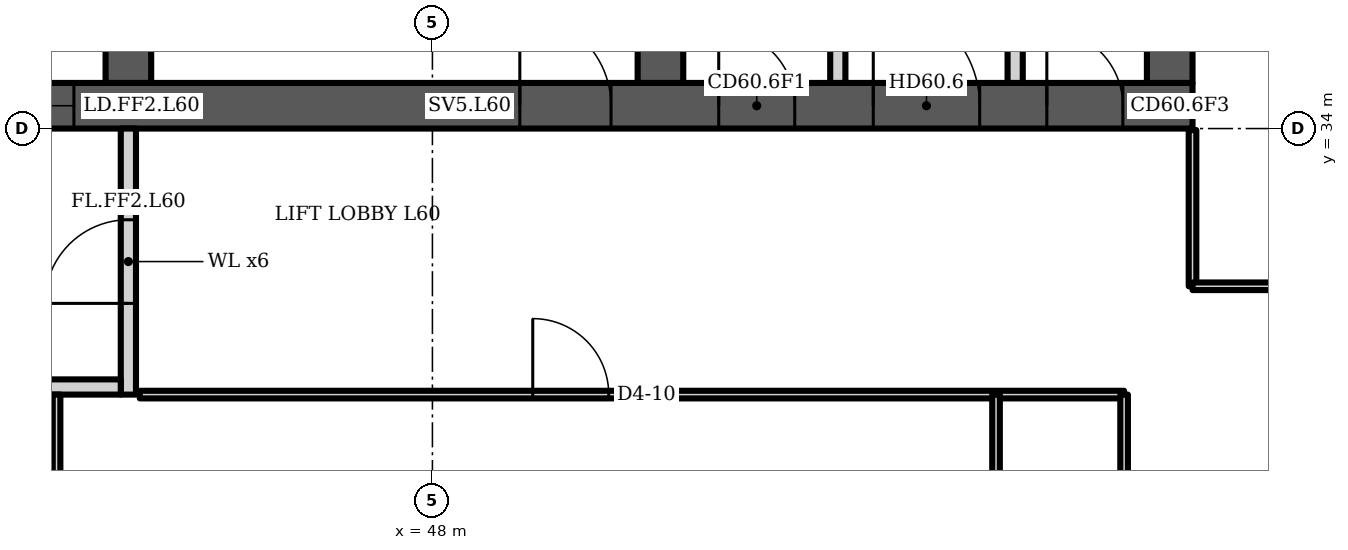
"""IFC4 building model, lengths in metres.
Left out: names, types, materials, properties, quantities, classifications, styles, units other than length and angle.
Written with IfcOpenShell. Run it as: python <this file> out.ifc"""

import sys

from ifc_helpers import new_model, si_unit, direction, frame, frame_2d, origin, place, context, subcontext, project, spatial, polyline, rectangle, outline, extrude, element, fill, save


model = new_model("IFC4")
c1 = context("Model", 3, precision=1e-05, world=origin(), true_north=direction((0.0, 1.0)))
c2 = subcontext(c1, "Body", "Model", "MODEL_VIEW")
j1 = project(units=[si_unit("LENGTHUNIT", "METRE"), si_unit("PLANEANGLEUNIT", "RADIAN")], contexts=[c1])
p1 = place(None, origin())
s1 = spatial("IfcSite", under=j1, at=p1, CompositionType="ELEMENT")
p2 = place(p1, origin())
s2 = spatial("IfcBuilding", under=s1, at=p2, CompositionType="ELEMENT")
p3 = place(p2, frame((0.0, 0.0, 239.5)))
s3 = spatial("IfcBuildingStorey", under=s2, at=p3, CompositionType="ELEMENT", Elevation=239.5)
p4 = place(p3, frame((23.0, 34.3, 0.0), z_axis=(0.0, 0.0, 1.0), x_axis=(1.0, 0.0, 0.0)))
e1 = element("IfcWall", 1, at=p4, inside=s3, PredefinedType="SHEAR", context=c2, shape_type="SweptSolid", body=[
    extrude(rectangle(XDim=35.0, YDim=0.6, at=frame_2d((17.5, 0.0))), origin(), (0.0, 0.0, 1.0), 3.6),
])
p5 = place(p4, frame((0.65, 0.0, 0.0)))
e2 = element("IfcOpeningElement", 2, at=p5, cuts=e1, PredefinedType="OPENING", context=c2, shape_type="SweptSolid", body=[
    extrude(rectangle(XDim=1.2, YDim=2.1, at=frame_2d((0.6, 1.05))), frame((0.0, 0.31, 0.0), z_axis=(0.0, -1.0, 0.0), x_axis=(1.0, 0.0, 0.0)), (0.0, 0.0, 1.0), 0.62),
])
p6 = place(p4, frame((7.717, 0.0, 0.0)))
e3 = element("IfcOpeningElement", 3, at=p6, cuts=e1, PredefinedType="OPENING", context=c2, shape_type="SweptSolid", body=[
    extrude(rectangle(XDim=1.1, YDim=2.1, at=frame_2d((0.55, 1.05))), frame((0.0, 0.31, 0.0), z_axis=(0.0, -1.0, 0.0), x_axis=(1.0, 0.0, 0.0)), (0.0, 0.0, 1.0), 0.62),
])
p7 = place(p4, frame((12.183, 0.0, 0.0)))
e4 = element("IfcOpeningElement", 4, at=p7, cuts=e1, PredefinedType="OPENING", context=c2, shape_type="SweptSolid", body=[
    extrude(rectangle(XDim=1.1, YDim=2.1, at=frame_2d((0.55, 1.05))), frame((0.0, 0.31, 0.0), z_axis=(0.0, -1.0, 0.0), x_axis=(1.0, 0.0, 0.0)), (0.0, 0.0, 1.0), 0.62),
])
p8 = place(p4, frame((9.8, 0.0, 0.0)))
e5 = element("IfcOpeningElement", 5, at=p8, cuts=e1, PredefinedType="OPENING", context=c2, shape_type="SweptSolid", body=[
    extrude(rectangle(XDim=1.4, YDim=2.1, at=frame_2d((0.7, 1.05))), frame((0.0, 0.31, 0.0), z_axis=(0.0, -1.0, 0.0), x_axis=(1.0, 0.0, 0.0)), (0.0, 0.0, 1.0), 0.62),
])
p9 = place(p4, frame((14.717, 0.0, 0.0)))
e6 = element("IfcOpeningElement", 6, at=p9, cuts=e1, PredefinedType="OPENING", context=c2, shape_type="SweptSolid", body=[
    extrude(rectangle(XDim=1.1, YDim=2.1, at=frame_2d((0.55, 1.05))), frame((0.0, 0.31, 0.0), z_axis=(0.0, -1.0, 0.0), x_axis=(1.0, 0.0, 0.0)), (0.0, 0.0, 1.0), 0.62),
])
p10 = place(p4, frame((16.95, 0.0, 0.0)))
e7 = element("IfcOpeningElement", 7, at=p10, cuts=e1, PredefinedType="OPENING", context=c2, shape_type="SweptSolid", body=[
    extrude(rectangle(XDim=1.1, YDim=2.1, at=frame_2d((0.55, 1.05))), frame((0.0, 0.31, 0.0), z_axis=(0.0, -1.0, 0.0), x_axis=(1.0, 0.0, 0.0)), (0.0, 0.0, 1.0), 0.62),
])
p11 = place(p4, frame((19.183, 0.0, 0.0)))
e8 = element("IfcOpeningElement", 8, at=p11, cuts=e1, PredefinedType="OPENING", context=c2, shape_type="SweptSolid", body=[
    extrude(rectangle(XDim=1.1, YDim=2.1, at=frame_2d((0.55, 1.05))), frame((0.0, 0.31, 0.0), z_axis=(0.0, -1.0, 0.0), x_axis=(1.0, 0.0, 0.0)), (0.0, 0.0, 1.0), 0.62),
])
p12 = place(p4, frame((26.15, 0.0, 0.0)))
e9 = element("IfcOpeningElement", 9, at=p12, cuts=e1, PredefinedType="OPENING", context=c2, shape_type="SweptSolid", body=[
    extrude(rectangle(XDim=1.2, YDim=2.1, at=frame_2d((0.6, 1.05))), frame((0.0, 0.31, 0.0), z_axis=(0.0, -1.0, 0.0), x_axis=(1.0, 0.0, 0.0)), (0.0, 0.0, 1.0), 0.62),
])
p13 = place(p4, frame((28.767, 0.0, 0.0)))
e10 = element("IfcOpeningElement", 10, at=p13, cuts=e1, PredefinedType="OPENING", context=c2, shape_type="SweptSolid", body=[
    extrude(rectangle(XDim=1.0, YDim=2.1, at=frame_2d((0.5, 1.05))), frame((0.0, 0.31, 0.0), z_axis=(0.0, -1.0, 0.0), x_axis=(1.0, 0.0, 0.0)), (0.0, 0.0, 1.0), 0.62),
])
p14 = place(p4, frame((33.083, 0.0, 0.0)))
e11 = element("IfcOpeningElement", 11, at=p14, cuts=e1, PredefinedType="OPENING", context=c2, shape_type="SweptSolid", body=[
    extrude(rectangle(XDim=1.0, YDim=2.1, at=frame_2d((0.5, 1.05))), frame((0.0, 0.31, 0.0), z_axis=(0.0, -1.0, 0.0), x_axis=(1.0, 0.0, 0.0)), (0.0, 0.0, 1.0), 0.62),
])
p15 = place(p4, frame((30.8, 0.0, 0.0)))
e12 = element("IfcOpeningElement", 12, at=p15, cuts=e1, PredefinedType="OPENING", context=c2, shape_type="SweptSolid", body=[
    extrude(rectangle(XDim=1.4, YDim=2.1, at=frame_2d((0.7, 1.05))), frame((0.0, 0.31, 0.0), z_axis=(0.0, -1.0, 0.0), x_axis=(1.0, 0.0, 0.0)), (0.0, 0.0, 1.0), 0.62),
])
p16 = place(p3, frame((44.0, 34.6, 0.0), z_axis=(0.0, 0.0, 1.0), x_axis=(0.0, 1.0, 0.0)))
e13 = element("IfcWall", 13, at=p16, inside=s3, PredefinedType="SHEAR", context=c2, shape_type="SweptSolid", body=[
    extrude(rectangle(XDim=14.784, YDim=0.6, at=frame_2d((7.392, 0.0))), origin(), (0.0, 0.0, 1.0), 3.6),
])
p17 = place(p16, frame((11.608, 0.0, 0.0)))
e14 = element("IfcOpeningElement", 14, at=p17, cuts=e13, PredefinedType="OPENING", context=c2, shape_type="SweptSolid", body=[
    extrude(rectangle(XDim=1.0, YDim=2.1, at=frame_2d((0.5, 1.05))), frame((0.0, 0.31, 0.0), z_axis=(0.0, -1.0, 0.0), x_axis=(1.0, 0.0, 0.0)), (0.0, 0.0, 1.0), 0.62),
])
p18 = place(p16, frame((3.8, 0.0, 0.0)))
e15 = element("IfcOpeningElement", 15, at=p18, cuts=e13, PredefinedType="OPENING", context=c2, shape_type="SweptSolid", body=[
    extrude(rectangle(XDim=1.1, YDim=2.1, at=frame_2d((0.55, 1.05))), frame((0.0, 0.31, 0.0), z_axis=(0.0, -1.0, 0.0), x_axis=(1.0, 0.0, 0.0)), (0.0, 0.0, 1.0), 0.62),
])
p19 = place(p3, frame((51.0, 34.6, 0.0), z_axis=(0.0, 0.0, 1.0), x_axis=(0.0, 1.0, 0.0)))
e16 = element("IfcWall", 16, at=p19, inside=s3, PredefinedType="SHEAR", context=c2, shape_type="SweptSolid", body=[
    extrude(rectangle(XDim=14.171, YDim=0.6, at=frame_2d((7.085, 0.0))), origin(), (0.0, 0.0, 1.0), 3.6),
])
p20 = place(p19, frame((3.8, 0.0, 0.0)))
e17 = element("IfcOpeningElement", 17, at=p20, cuts=e16, PredefinedType="OPENING", context=c2, shape_type="SweptSolid", body=[
    extrude(rectangle(XDim=1.1, YDim=2.1, at=frame_2d((0.55, 1.05))), frame((0.0, 0.31, 0.0), z_axis=(0.0, -1.0, 0.0), x_axis=(1.0, 0.0, 0.0)), (0.0, 0.0, 1.0), 0.62),
])
p21 = place(p3, frame((57.7, 34.6, 0.0), z_axis=(0.0, 0.0, 1.0), x_axis=(0.0, 1.0, 0.0)))
e18 = element("IfcWall", 18, at=p21, inside=s3, PredefinedType="SHEAR", context=c2, shape_type="SweptSolid", body=[
    extrude(rectangle(XDim=13.585, YDim=0.6, at=frame_2d((6.792, 0.0))), origin(), (0.0, 0.0, 1.0), 3.6),
])
p22 = place(p3, frame((0.0, 0.0, -0.0)))
e19 = element("IfcWall", 19, at=p22, inside=s3, PredefinedType="PARTITIONING", context=c2, shape_type="SweptSolid", body=[
    extrude(outline(polyline([(41.567, 37.1), (39.433, 37.1), (39.433, 34.6), (39.233, 34.6), (39.233, 37.45), (37.3, 37.45), (37.3, 37.65), (39.233, 37.65), (39.433, 37.65), (39.433, 37.3), (41.567, 37.3), (41.567, 37.35), (41.767, 37.35), (43.7, 37.35), (43.7, 37.15), (41.767, 37.15), (41.767, 34.6), (41.567, 34.6), (41.567, 37.1)])), origin(), (0.0, 0.0, 1.0), 3.2),
])
p23 = place(p3, frame((0.0, 0.0, -0.0)))
e20 = element("IfcWall", 20, at=p23, inside=s3, PredefinedType="PARTITIONING", context=c2, shape_type="SweptSolid", body=[
    extrude(outline(polyline([(53.233, 34.6), (53.233, 37.3), (53.433, 37.3), (53.433, 34.6), (53.233, 34.6)])), origin(), (0.0, 0.0, 1.0), 3.2),
])
p24 = place(p3, frame((0.0, 0.0, -0.0)))
e21 = element("IfcWall", 21, at=p24, inside=s3, PredefinedType="PARTITIONING", context=c2, shape_type="SweptSolid", body=[
    extrude(outline(polyline([(55.567, 34.6), (55.567, 37.3), (55.767, 37.3), (55.767, 34.6), (55.567, 34.6)])), origin(), (0.0, 0.0, 1.0), 3.2),
])
p25 = place(p3, frame((44.0, 30.5, 0.0), z_axis=(0.0, 0.0, 1.0), x_axis=(0.0, 1.0, 0.0)))
e22 = element("IfcWall", 22, at=p25, inside=s3, PredefinedType="PARTITIONING", context=c2, shape_type="SweptSolid", body=[
    extrude(rectangle(XDim=3.5, YDim=0.2, at=frame_2d((1.75, 0.0))), origin(), (0.0, 0.0, 1.0), 3.2),
])
p26 = place(p25, frame((1.2, 0.0, 0.0)))
e23 = element("IfcOpeningElement", 23, at=p26, cuts=e22, PredefinedType="OPENING", context=c2, shape_type="SweptSolid", body=[
    extrude(rectangle(XDim=1.1, YDim=2.1, at=frame_2d((0.55, 1.05))), frame((0.0, 0.11, 0.0), z_axis=(0.0, -1.0, 0.0), x_axis=(1.0, 0.0, 0.0)), (0.0, 0.0, 1.0), 0.22),
])
p27 = place(p3, frame((41.1, 30.6, 0.0), z_axis=(0.0, 0.0, 1.0), x_axis=(1.0, 0.0, 0.0)))
e24 = element("IfcWall", 24, at=p27, inside=s3, PredefinedType="PARTITIONING", context=c2, shape_type="SweptSolid", body=[
    extrude(rectangle(XDim=2.8, YDim=0.2, at=frame_2d((1.4, 0.0))), origin(), (0.0, 0.0, 1.0), 3.2),
])
p28 = place(p3, frame((43.055, 14.86, 0.0), z_axis=(0.0, 0.0, 1.0), x_axis=(0.0, 1.0, 0.0)))
e25 = element("IfcWall", 25, at=p28, inside=s3, PredefinedType="PARTITIONING", context=c2, shape_type="SweptSolid", body=[
    extrude(rectangle(XDim=15.64, YDim=0.1, at=frame_2d((7.82, 0.0))), origin(), (0.0, 0.0, 1.0), 3.2),
])
p29 = place(p28, frame((4.05, 0.0, 0.0)))
e26 = element("IfcOpeningElement", 26, at=p29, cuts=e25, PredefinedType="OPENING", context=c2, shape_type="SweptSolid", body=[
    extrude(rectangle(XDim=1.1, YDim=2.1, at=frame_2d((0.55, 1.05))), frame((0.0, 0.06, 0.0), z_axis=(0.0, -1.0, 0.0), x_axis=(1.0, 0.0, 0.0)), (0.0, 0.0, 1.0), 0.12),
])
p30 = place(p3, frame((44.15, 30.5, 0.0), z_axis=(0.0, 0.0, 1.0), x_axis=(1.0, 0.0, 0.0)))
e27 = element("IfcWall", 27, at=p30, inside=s3, PredefinedType="PARTITIONING", context=c2, shape_type="SweptSolid", body=[
    extrude(rectangle(XDim=12.95, YDim=0.1, at=frame_2d((6.475, 0.0))), origin(), (0.0, 0.0, 1.0), 3.2),
])
p31 = place(p30, frame((5.17, 0.0, 0.0)))
e28 = element("IfcOpeningElement", 28, at=p31, cuts=e27, PredefinedType="OPENING", context=c2, shape_type="SweptSolid", body=[
    extrude(rectangle(XDim=1.0, YDim=2.1, at=frame_2d((0.5, 1.05))), frame((0.0, 0.06, 0.0), z_axis=(0.0, -1.0, 0.0), x_axis=(1.0, 0.0, 0.0)), (0.0, 0.0, 1.0), 0.12),
])
p32 = place(p3, frame((55.415, 4.345, 0.0), z_axis=(0.0, 0.0, 1.0), x_axis=(0.0, 1.0, 0.0)))
e29 = element("IfcWall", 29, at=p32, inside=s3, PredefinedType="PARTITIONING", context=c2, shape_type="SweptSolid", body=[
    extrude(rectangle(XDim=26.155, YDim=0.1, at=frame_2d((13.078, 0.0))), origin(), (0.0, 0.0, 1.0), 3.2),
])
p33 = place(p3, frame((57.1, 14.345, 0.0), z_axis=(0.0, 0.0, 1.0), x_axis=(0.0, 1.0, 0.0)))
e30 = element("IfcWall", 30, at=p33, inside=s3, PredefinedType="PARTITIONING", context=c2, shape_type="SweptSolid", body=[
    extrude(rectangle(XDim=16.155, YDim=0.1, at=frame_2d((8.078, 0.0))), origin(), (0.0, 0.0, 1.0), 3.2),
])
p34 = place(p33, frame((5.215, 0.0, 0.0)))
e31 = element("IfcOpeningElement", 31, at=p34, cuts=e30, PredefinedType="OPENING", context=c2, shape_type="SweptSolid", body=[
    extrude(rectangle(XDim=1.0, YDim=2.1, at=frame_2d((0.5, 1.05))), frame((0.0, 0.06, 0.0), z_axis=(0.0, -1.0, 0.0), x_axis=(1.0, 0.0, 0.0)), (0.0, 0.0, 1.0), 0.12),
])
p35 = place(p3, frame((58.0, 31.925, 0.0), z_axis=(0.0, 0.0, 1.0), x_axis=(0.0, 1.0, 0.0)))
e32 = element("IfcWall", 32, at=p35, inside=s3, PredefinedType="PARTITIONING", context=c2, shape_type="SweptSolid", body=[
    extrude(rectangle(XDim=2.055, YDim=0.1, at=frame_2d((1.027, 0.0))), origin(), (0.0, 0.0, 1.0), 3.2),
])
p36 = place(p3, frame((58.0, 31.925, 0.0), z_axis=(0.0, 0.0, 1.0), x_axis=(1.0, 0.0, 0.0)))
e33 = element("IfcWall", 33, at=p36, inside=s3, PredefinedType="PARTITIONING", context=c2, shape_type="SweptSolid", body=[
    extrude(rectangle(XDim=1.425, YDim=0.1, at=frame_2d((0.712, 0.0))), origin(), (0.0, 0.0, 1.0), 3.2),
])
p37 = place(p3, frame((58.9, 27.435, 0.0), z_axis=(0.0, 0.0, 1.0), x_axis=(0.178584, 0.983924, 0.0)))
e34 = element("IfcWall", 34, at=p37, inside=s3, PredefinedType="PARTITIONING", context=c2, shape_type="SweptSolid", body=[
    extrude(rectangle(XDim=2.353, YDim=0.1, at=frame_2d((1.176, 0.0))), origin(), (0.0, 0.0, 1.0), 3.2),
])
p38 = place(p11, origin())
e35 = element("IfcDoor", 35, at=p38, inside=s3, OperationType="DOUBLE_DOOR_SLIDING", PredefinedType="DOOR", context=c2, shape_type="SweptSolid", body=[
    extrude(rectangle(XDim=1.1, YDim=2.1, at=frame_2d((0.55, 1.05))), frame((0.0, 0.025, 0.0), z_axis=(0.0, -1.0, 0.0), x_axis=(1.0, 0.0, 0.0)), (0.0, 0.0, 1.0), 0.05),
])
fill(e8, e35)
p39 = place(p12, origin())
e36 = element("IfcDoor", 36, at=p39, inside=s3, OperationType="SINGLE_SWING_LEFT", PredefinedType="DOOR", context=c2, shape_type="SweptSolid", body=[
    extrude(rectangle(XDim=1.2, YDim=2.1, at=frame_2d((0.6, 1.05))), frame((0.0, 0.025, 0.0), z_axis=(0.0, -1.0, 0.0), x_axis=(1.0, 0.0, 0.0)), (0.0, 0.0, 1.0), 0.05),
])
fill(e9, e36)
p40 = place(p13, origin())
e37 = element("IfcDoor", 37, at=p40, inside=s3, OperationType="SINGLE_SWING_LEFT", PredefinedType="DOOR", context=c2, shape_type="SweptSolid", body=[
    extrude(rectangle(XDim=1.0, YDim=2.1, at=frame_2d((0.5, 1.05))), frame((0.0, 0.025, 0.0), z_axis=(0.0, -1.0, 0.0), x_axis=(1.0, 0.0, 0.0)), (0.0, 0.0, 1.0), 0.05),
])
fill(e10, e37)
p41 = place(p14, origin())
e38 = element("IfcDoor", 38, at=p41, inside=s3, OperationType="SINGLE_SWING_LEFT", PredefinedType="DOOR", context=c2, shape_type="SweptSolid", body=[
    extrude(rectangle(XDim=1.0, YDim=2.1, at=frame_2d((0.5, 1.05))), frame((0.0, 0.025, 0.0), z_axis=(0.0, -1.0, 0.0), x_axis=(1.0, 0.0, 0.0)), (0.0, 0.0, 1.0), 0.05),
])
fill(e11, e38)
p42 = place(p15, origin())
e39 = element("IfcDoor", 39, at=p42, inside=s3, OperationType="DOUBLE_DOOR_SINGLE_SWING", PredefinedType="DOOR", context=c2, shape_type="SweptSolid", body=[
    extrude(rectangle(XDim=1.4, YDim=2.1, at=frame_2d((0.7, 1.05))), frame((0.0, 0.025, 0.0), z_axis=(0.0, -1.0, 0.0), x_axis=(1.0, 0.0, 0.0)), (0.0, 0.0, 1.0), 0.05),
])
fill(e12, e39)
p43 = place(p26, origin())
e40 = element("IfcDoor", 40, at=p43, inside=s3, OperationType="SINGLE_SWING_LEFT", PredefinedType="DOOR", context=c2, shape_type="SweptSolid", body=[
    extrude(rectangle(XDim=1.1, YDim=2.1, at=frame_2d((0.55, 1.05))), frame((0.0, 0.025, 0.0), z_axis=(0.0, -1.0, 0.0), x_axis=(1.0, 0.0, 0.0)), (0.0, 0.0, 1.0), 0.05),
])
fill(e23, e40)
p44 = place(p31, origin())
e41 = element("IfcDoor", 41, at=p44, inside=s3, OperationType="SINGLE_SWING_LEFT", PredefinedType="DOOR", context=c2, shape_type="SweptSolid", body=[
    extrude(rectangle(XDim=1.0, YDim=2.1, at=frame_2d((0.5, 1.05))), frame((0.0, 0.025, 0.0), z_axis=(0.0, -1.0, 0.0), x_axis=(1.0, 0.0, 0.0)), (0.0, 0.0, 1.0), 0.05),
])
fill(e28, e41)
save(model, sys.argv[1])
